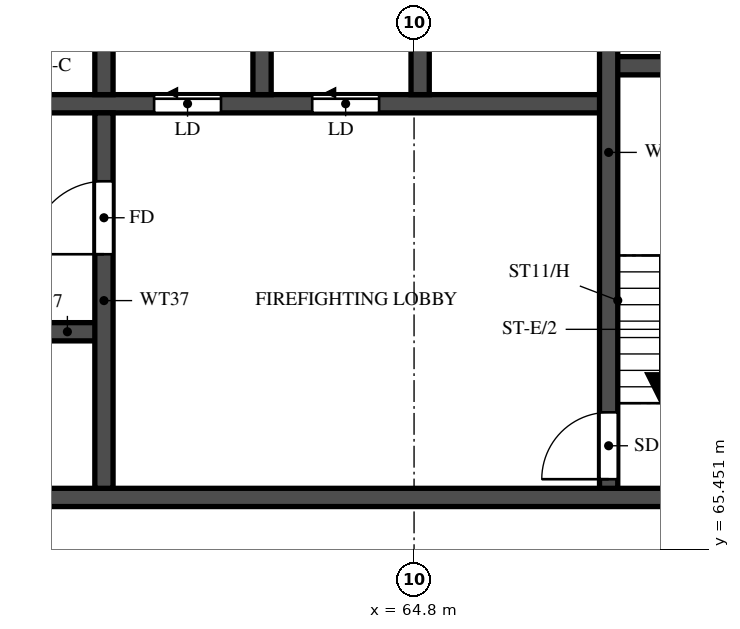
"""IFC4 building model, lengths in metres.
Left out: names, types, materials, properties, quantities, classifications, styles, units other than length and angle.
Written with IfcOpenShell. Run it as: python <this file> out.ifc"""

import sys

from ifc_helpers import new_model, si_unit, direction, frame, frame_2d, origin, place, context, subcontext, project, spatial, rectangle, extrude, element, fill, save


model = new_model("IFC4")
c1 = context("Model", 3, precision=1e-05, world=origin(), true_north=direction((0.0, 1.0)))
c2 = subcontext(c1, "Body", "Model", "MODEL_VIEW")
j1 = project(units=[si_unit("LENGTHUNIT", "METRE"), si_unit("PLANEANGLEUNIT", "RADIAN")], contexts=[c1])
p1 = place(None, origin())
s1 = spatial("IfcSite", under=j1, at=p1, CompositionType="ELEMENT")
p2 = place(p1, origin())
s2 = spatial("IfcBuilding", under=s1, at=p2, CompositionType="ELEMENT")
p3 = place(p2, frame((0.0, 0.0, 215.0)))
s3 = spatial("IfcBuildingStorey", under=s2, at=p3, CompositionType="ELEMENT", Elevation=215.0)
p4 = place(p3, frame((29.2, 66.3, 0.0), z_axis=(0.0, 0.0, 1.0), x_axis=(1.0, 0.0, 0.0)))
e1 = element("IfcWall", 1, at=p4, inside=s3, PredefinedType="SHEAR", context=c2, shape_type="SweptSolid", body=[
    extrude(rectangle(XDim=42.4, YDim=0.3, at=frame_2d((21.2, 0.0))), origin(), (0.0, 0.0, 1.0), 3.22),
])
p5 = place(p4, frame((1.425, 0.0, 0.0)))
e2 = element("IfcOpeningElement", 2, at=p5, cuts=e1, PredefinedType="OPENING", context=c2, shape_type="SweptSolid", body=[
    extrude(rectangle(XDim=1.1, YDim=2.1, at=frame_2d((0.55, 1.05))), frame((0.0, 0.16, 0.0), z_axis=(0.0, -1.0, 0.0), x_axis=(1.0, 0.0, 0.0)), (0.0, 0.0, 1.0), 0.32),
])
p6 = place(p4, frame((4.2, 0.0, 0.0)))
e3 = element("IfcOpeningElement", 3, at=p6, cuts=e1, PredefinedType="OPENING", context=c2, shape_type="SweptSolid", body=[
    extrude(rectangle(XDim=1.8, YDim=2.1, at=frame_2d((0.9, 1.05))), frame((0.0, 0.16, 0.0), z_axis=(0.0, -1.0, 0.0), x_axis=(1.0, 0.0, 0.0)), (0.0, 0.0, 1.0), 0.32),
])
p7 = place(p3, frame((35.65, 69.025, 0.0), z_axis=(0.0, 0.0, 1.0), x_axis=(1.0, 0.0, 0.0)))
e4 = element("IfcWall", 4, at=p7, inside=s3, PredefinedType="SHEAR", context=c2, shape_type="SweptSolid", body=[
    extrude(rectangle(XDim=24.05, YDim=0.3, at=frame_2d((12.025, 0.0))), origin(), (0.0, 0.0, 1.0), 3.22),
])
p8 = place(p7, frame((0.975, 0.0, 0.0)))
e5 = element("IfcOpeningElement", 5, at=p8, cuts=e4, PredefinedType="OPENING", context=c2, shape_type="SweptSolid", body=[
    extrude(rectangle(XDim=1.1, YDim=2.1, at=frame_2d((0.55, 1.05))), frame((0.0, 0.16, 0.0), z_axis=(0.0, -1.0, 0.0), x_axis=(1.0, 0.0, 0.0)), (0.0, 0.0, 1.0), 0.32),
])
p9 = place(p7, frame((3.725, 0.0, 0.0)))
e6 = element("IfcOpeningElement", 6, at=p9, cuts=e4, PredefinedType="OPENING", context=c2, shape_type="SweptSolid", body=[
    extrude(rectangle(XDim=1.1, YDim=2.1, at=frame_2d((0.55, 1.05))), frame((0.0, 0.16, 0.0), z_axis=(0.0, -1.0, 0.0), x_axis=(1.0, 0.0, 0.0)), (0.0, 0.0, 1.0), 0.32),
])
p10 = place(p7, frame((6.475, 0.0, 0.0)))
e7 = element("IfcOpeningElement", 7, at=p10, cuts=e4, PredefinedType="OPENING", context=c2, shape_type="SweptSolid", body=[
    extrude(rectangle(XDim=1.1, YDim=2.1, at=frame_2d((0.55, 1.05))), frame((0.0, 0.16, 0.0), z_axis=(0.0, -1.0, 0.0), x_axis=(1.0, 0.0, 0.0)), (0.0, 0.0, 1.0), 0.32),
])
p11 = place(p7, frame((9.225, 0.0, 0.0)))
e8 = element("IfcOpeningElement", 8, at=p11, cuts=e4, PredefinedType="OPENING", context=c2, shape_type="SweptSolid", body=[
    extrude(rectangle(XDim=1.1, YDim=2.1, at=frame_2d((0.55, 1.05))), frame((0.0, 0.16, 0.0), z_axis=(0.0, -1.0, 0.0), x_axis=(1.0, 0.0, 0.0)), (0.0, 0.0, 1.0), 0.32),
])
p12 = place(p7, frame((11.975, 0.0, 0.0)))
e9 = element("IfcOpeningElement", 9, at=p12, cuts=e4, PredefinedType="OPENING", context=c2, shape_type="SweptSolid", body=[
    extrude(rectangle(XDim=1.1, YDim=2.1, at=frame_2d((0.55, 1.05))), frame((0.0, 0.16, 0.0), z_axis=(0.0, -1.0, 0.0), x_axis=(1.0, 0.0, 0.0)), (0.0, 0.0, 1.0), 0.32),
])
p13 = place(p7, frame((14.725, 0.0, 0.0)))
e10 = element("IfcOpeningElement", 10, at=p13, cuts=e4, PredefinedType="OPENING", context=c2, shape_type="SweptSolid", body=[
    extrude(rectangle(XDim=1.1, YDim=2.1, at=frame_2d((0.55, 1.05))), frame((0.0, 0.16, 0.0), z_axis=(0.0, -1.0, 0.0), x_axis=(1.0, 0.0, 0.0)), (0.0, 0.0, 1.0), 0.32),
])
p14 = place(p7, frame((17.6, 0.0, 0.0)))
e11 = element("IfcOpeningElement", 11, at=p14, cuts=e4, PredefinedType="OPENING", context=c2, shape_type="SweptSolid", body=[
    extrude(rectangle(XDim=1.1, YDim=2.1, at=frame_2d((0.55, 1.05))), frame((0.0, 0.16, 0.0), z_axis=(0.0, -1.0, 0.0), x_axis=(1.0, 0.0, 0.0)), (0.0, 0.0, 1.0), 0.32),
])
p15 = place(p7, frame((20.6, 0.0, 0.0)))
e12 = element("IfcOpeningElement", 12, at=p15, cuts=e4, PredefinedType="OPENING", context=c2, shape_type="SweptSolid", body=[
    extrude(rectangle(XDim=1.1, YDim=2.1, at=frame_2d((0.55, 1.05))), frame((0.0, 0.16, 0.0), z_axis=(0.0, -1.0, 0.0), x_axis=(1.0, 0.0, 0.0)), (0.0, 0.0, 1.0), 0.32),
])
p16 = place(p3, frame((32.8, 72.775, 0.0), z_axis=(0.0, 0.0, 1.0), x_axis=(1.0, 0.0, 0.0)))
e13 = element("IfcWall", 13, at=p16, inside=s3, PredefinedType="SHEAR", context=c2, shape_type="SweptSolid", body=[
    extrude(rectangle(XDim=35.2, YDim=0.3, at=frame_2d((17.6, 0.0))), origin(), (0.0, 0.0, 1.0), 3.22),
])
p17 = place(p16, frame((19.8, 0.0, 0.0)))
e14 = element("IfcOpeningElement", 14, at=p17, cuts=e13, PredefinedType="OPENING", context=c2, shape_type="SweptSolid", body=[
    extrude(rectangle(XDim=1.1, YDim=2.1, at=frame_2d((0.55, 1.05))), frame((0.0, 0.16, 0.0), z_axis=(0.0, -1.0, 0.0), x_axis=(1.0, 0.0, 0.0)), (0.0, 0.0, 1.0), 0.32),
])
p18 = place(p16, frame((27.725, 0.0, 0.0)))
e15 = element("IfcOpeningElement", 15, at=p18, cuts=e13, PredefinedType="OPENING", context=c2, shape_type="SweptSolid", body=[
    extrude(rectangle(XDim=1.1, YDim=2.1, at=frame_2d((0.55, 1.05))), frame((0.0, 0.16, 0.0), z_axis=(0.0, -1.0, 0.0), x_axis=(1.0, 0.0, 0.0)), (0.0, 0.0, 1.0), 0.32),
])
p19 = place(p16, frame((30.325, 0.0, 0.0)))
e16 = element("IfcOpeningElement", 16, at=p19, cuts=e13, PredefinedType="OPENING", context=c2, shape_type="SweptSolid", body=[
    extrude(rectangle(XDim=1.1, YDim=2.1, at=frame_2d((0.55, 1.05))), frame((0.0, 0.16, 0.0), z_axis=(0.0, -1.0, 0.0), x_axis=(1.0, 0.0, 0.0)), (0.0, 0.0, 1.0), 0.32),
])
p20 = place(p16, frame((3.825, 0.0, 0.0)))
e17 = element("IfcOpeningElement", 17, at=p20, cuts=e13, PredefinedType="OPENING", context=c2, shape_type="SweptSolid", body=[
    extrude(rectangle(XDim=1.1, YDim=2.1, at=frame_2d((0.55, 1.05))), frame((0.0, 0.16, 0.0), z_axis=(0.0, -1.0, 0.0), x_axis=(1.0, 0.0, 0.0)), (0.0, 0.0, 1.0), 0.32),
])
p21 = place(p16, frame((6.575, 0.0, 0.0)))
e18 = element("IfcOpeningElement", 18, at=p21, cuts=e13, PredefinedType="OPENING", context=c2, shape_type="SweptSolid", body=[
    extrude(rectangle(XDim=1.1, YDim=2.1, at=frame_2d((0.55, 1.05))), frame((0.0, 0.16, 0.0), z_axis=(0.0, -1.0, 0.0), x_axis=(1.0, 0.0, 0.0)), (0.0, 0.0, 1.0), 0.32),
])
p22 = place(p16, frame((9.325, 0.0, 0.0)))
e19 = element("IfcOpeningElement", 19, at=p22, cuts=e13, PredefinedType="OPENING", context=c2, shape_type="SweptSolid", body=[
    extrude(rectangle(XDim=1.1, YDim=2.1, at=frame_2d((0.55, 1.05))), frame((0.0, 0.16, 0.0), z_axis=(0.0, -1.0, 0.0), x_axis=(1.0, 0.0, 0.0)), (0.0, 0.0, 1.0), 0.32),
])
p23 = place(p16, frame((12.075, 0.0, 0.0)))
e20 = element("IfcOpeningElement", 20, at=p23, cuts=e13, PredefinedType="OPENING", context=c2, shape_type="SweptSolid", body=[
    extrude(rectangle(XDim=1.1, YDim=2.1, at=frame_2d((0.55, 1.05))), frame((0.0, 0.16, 0.0), z_axis=(0.0, -1.0, 0.0), x_axis=(1.0, 0.0, 0.0)), (0.0, 0.0, 1.0), 0.32),
])
p24 = place(p16, frame((14.825, 0.0, 0.0)))
e21 = element("IfcOpeningElement", 21, at=p24, cuts=e13, PredefinedType="OPENING", context=c2, shape_type="SweptSolid", body=[
    extrude(rectangle(XDim=1.1, YDim=2.1, at=frame_2d((0.55, 1.05))), frame((0.0, 0.16, 0.0), z_axis=(0.0, -1.0, 0.0), x_axis=(1.0, 0.0, 0.0)), (0.0, 0.0, 1.0), 0.32),
])
p25 = place(p16, frame((17.575, 0.0, 0.0)))
e22 = element("IfcOpeningElement", 22, at=p25, cuts=e13, PredefinedType="OPENING", context=c2, shape_type="SweptSolid", body=[
    extrude(rectangle(XDim=1.1, YDim=2.1, at=frame_2d((0.55, 1.05))), frame((0.0, 0.16, 0.0), z_axis=(0.0, -1.0, 0.0), x_axis=(1.0, 0.0, 0.0)), (0.0, 0.0, 1.0), 0.32),
])
p26 = place(p16, frame((0.95, 0.0, 0.0)))
e23 = element("IfcOpeningElement", 23, at=p26, cuts=e13, PredefinedType="OPENING", context=c2, shape_type="SweptSolid", body=[
    extrude(rectangle(XDim=1.1, YDim=2.1, at=frame_2d((0.55, 1.05))), frame((0.0, 0.16, 0.0), z_axis=(0.0, -1.0, 0.0), x_axis=(1.0, 0.0, 0.0)), (0.0, 0.0, 1.0), 0.32),
])
p27 = place(p3, frame((68.0, 73.4, 0.0), z_axis=(0.0, 0.0, 1.0), x_axis=(1.0, 0.0, 0.0)))
e24 = element("IfcWall", 24, at=p27, inside=s3, PredefinedType="SHEAR", context=c2, shape_type="SweptSolid", body=[
    extrude(rectangle(XDim=3.1, YDim=0.3, at=frame_2d((1.55, 0.0))), origin(), (0.0, 0.0, 1.0), 3.22),
])
p28 = place(p3, frame((68.0, 66.45, 0.0), z_axis=(0.0, 0.0, 1.0), x_axis=(0.0, 1.0, 0.0)))
e25 = element("IfcWall", 25, at=p28, inside=s3, PredefinedType="SHEAR", context=c2, shape_type="SweptSolid", body=[
    extrude(rectangle(XDim=11.05, YDim=0.3, at=frame_2d((5.525, 0.0))), origin(), (0.0, 0.0, 1.0), 3.22),
])
p29 = place(p28, frame((0.15, 0.0, 0.0)))
e26 = element("IfcOpeningElement", 26, at=p29, cuts=e25, PredefinedType="OPENING", context=c2, shape_type="SweptSolid", body=[
    extrude(rectangle(XDim=1.1, YDim=2.1, at=frame_2d((0.55, 1.05))), frame((0.0, 0.16, 0.0), z_axis=(0.0, -1.0, 0.0), x_axis=(1.0, 0.0, 0.0)), (0.0, 0.0, 1.0), 0.32),
])
p30 = place(p3, frame((59.7, 66.45, 0.0), z_axis=(0.0, 0.0, 1.0), x_axis=(0.0, 1.0, 0.0)))
e27 = element("IfcWall", 27, at=p30, inside=s3, PredefinedType="SHEAR", context=c2, shape_type="SweptSolid", body=[
    extrude(rectangle(XDim=6.175, YDim=0.3, at=frame_2d((3.087, 0.0))), origin(), (0.0, 0.0, 1.0), 3.22),
])
p31 = place(p30, frame((3.85, 0.0, 0.0)))
e28 = element("IfcOpeningElement", 28, at=p31, cuts=e27, PredefinedType="OPENING", context=c2, shape_type="SweptSolid", body=[
    extrude(rectangle(XDim=1.2, YDim=2.1, at=frame_2d((0.6, 1.05))), frame((0.0, 0.16, 0.0), z_axis=(0.0, -1.0, 0.0), x_axis=(1.0, 0.0, 0.0)), (0.0, 0.0, 1.0), 0.32),
])
for number, where, z_axis, x_axis in (
    (29, (59.7, 72.925, 0.0), (0.0, 0.0, 1.0), (0.0, 1.0, 0.0)),
    (30, (62.3, 72.925, 0.0), (0.0, 0.0, 1.0), (0.0, 1.0, 0.0)),
    (31, (64.9, 72.925, 0.0), (0.0, 0.0, 1.0), (0.0, 1.0, 0.0)),
):
    element("IfcWall", number, at=place(p3, frame(where, z_axis=z_axis, x_axis=x_axis)), inside=s3, PredefinedType="SHEAR", context=c2, shape_type="SweptSolid", body=[
        extrude(rectangle(XDim=2.95, YDim=0.3, at=frame_2d((1.475, 0.0))), origin(), (0.0, 0.0, 1.0), 3.22),
    ])
p32 = place(p29, origin())
e32 = element("IfcDoor", 32, at=p32, inside=s3, OperationType="SINGLE_SWING_RIGHT", PredefinedType="DOOR", context=c2, shape_type="SweptSolid", body=[
    extrude(rectangle(XDim=1.1, YDim=2.1, at=frame_2d((0.55, 1.05))), frame((0.0, 0.025, 0.0), z_axis=(0.0, -1.0, 0.0), x_axis=(1.0, 0.0, 0.0)), (0.0, 0.0, 1.0), 0.05),
])
fill(e26, e32)
p33 = place(p31, origin())
e33 = element("IfcDoor", 33, at=p33, inside=s3, OperationType="SINGLE_SWING_LEFT", PredefinedType="DOOR", context=c2, shape_type="SweptSolid", body=[
    extrude(rectangle(XDim=1.2, YDim=2.1, at=frame_2d((0.6, 1.05))), frame((0.0, 0.025, 0.0), z_axis=(0.0, -1.0, 0.0), x_axis=(1.0, 0.0, 0.0)), (0.0, 0.0, 1.0), 0.05),
])
fill(e28, e33)
p34 = place(p18, origin())
e34 = element("IfcDoor", 34, at=p34, inside=s3, OperationType="SLIDING_TO_LEFT", PredefinedType="DOOR", context=c2, shape_type="SweptSolid", body=[
    extrude(rectangle(XDim=1.1, YDim=2.1, at=frame_2d((0.55, 1.05))), frame((0.0, 0.025, 0.0), z_axis=(0.0, -1.0, 0.0), x_axis=(1.0, 0.0, 0.0)), (0.0, 0.0, 1.0), 0.05),
])
fill(e15, e34)
p35 = place(p19, origin())
e35 = element("IfcDoor", 35, at=p35, inside=s3, OperationType="SLIDING_TO_LEFT", PredefinedType="DOOR", context=c2, shape_type="SweptSolid", body=[
    extrude(rectangle(XDim=1.1, YDim=2.1, at=frame_2d((0.55, 1.05))), frame((0.0, 0.025, 0.0), z_axis=(0.0, -1.0, 0.0), x_axis=(1.0, 0.0, 0.0)), (0.0, 0.0, 1.0), 0.05),
])
fill(e16, e35)
save(model, sys.argv[1])
